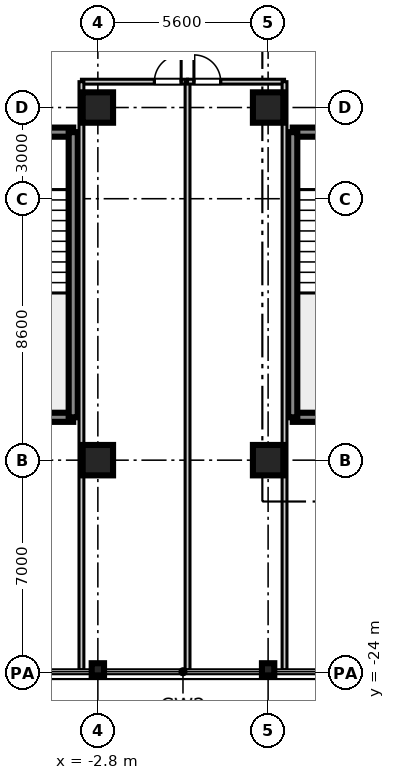
"""IFC4 building model, lengths in metres.
Left out: names, types, materials, properties, quantities, classifications, styles, units other than length and angle.
Written with IfcOpenShell. Run it as: python <this file> out.ifc"""

import sys

from ifc_helpers import new_model, si_unit, direction, frame, frame_2d, origin, origin_2d, place, context, subcontext, project, spatial, rectangle, i_section, extrude, source, transform, mapped, element, fill, save


model = new_model("IFC4")
c1 = context("Model", 3, precision=1e-05, world=origin(), true_north=direction((0.0, 1.0)))
c2 = subcontext(c1, "Body", "Model", "MODEL_VIEW")
j1 = project(units=[si_unit("LENGTHUNIT", "METRE"), si_unit("PLANEANGLEUNIT", "RADIAN")], contexts=[c1])
p1 = place(None, origin())
s1 = spatial("IfcSite", under=j1, at=p1, CompositionType="ELEMENT")
p2 = place(p1, origin())
s2 = spatial("IfcBuilding", under=s1, at=p2, CompositionType="ELEMENT")
p3 = place(p2, frame((0.0, 0.0, 204.9)))
s3 = spatial("IfcBuildingStorey", under=s2, at=p3, CompositionType="ELEMENT", Elevation=204.9)
m1 = source(origin(), c2, "Body", "SweptSolid", [
    extrude(rectangle(XDim=1.0, YDim=1.0, at=origin_2d()), origin(), (0.0, 0.0, 1.0), 3.655),
])
for number, where, z_axis, x_axis in (
    (1, (-2.8, -17.0, 0.0), (0.0, 0.0, 1.0), (1.0, 0.0, 0.0)),
    (2, (-2.8, -5.4, 0.0), (0.0, 0.0, 1.0), (1.0, 0.0, 0.0)),
    (3, (2.8, -17.0, 0.0), (0.0, 0.0, 1.0), (1.0, 0.0, 0.0)),
    (4, (2.8, -5.4, 0.0), (0.0, 0.0, 1.0), (1.0, 0.0, 0.0)),
):
    element("IfcColumn", number, at=place(p3, frame(where, z_axis=z_axis, x_axis=x_axis)), inside=s3, PredefinedType="COLUMN", context=c2, shape_type="MappedRepresentation", body=[
        mapped(m1, transform((0.0, 0.0, 0.0), scale=1.0)),
    ])
m2 = source(origin(), c2, "Body", "SweptSolid", [
    extrude(i_section(OverallWidth=0.401, OverallDepth=0.406, WebThickness=0.016, FlangeThickness=0.025, at=origin_2d()), origin(), (0.0, 0.0, 1.0), 3.655),
])
for number, where, z_axis, x_axis in (
    (5, (-2.8, -23.88, 0.0), (0.0, 0.0, 1.0), (0.0, 1.0, 0.0)),
    (6, (2.8, -23.88, 0.0), (0.0, 0.0, 1.0), (0.0, 1.0, 0.0)),
):
    element("IfcColumn", number, at=place(p3, frame(where, z_axis=z_axis, x_axis=x_axis)), inside=s3, PredefinedType="COLUMN", context=c2, shape_type="MappedRepresentation", body=[
        mapped(m2, transform((0.0, 0.0, 0.0), scale=1.0)),
    ])
m3 = source(origin(), c2, "Body", "SweptSolid", [
    extrude(rectangle(XDim=3.98, YDim=0.3, at=frame_2d((1.99, 0.0))), origin(), (0.0, 0.0, 1.0), 3.41),
])
for number, where, z_axis, x_axis in (
    (7, (3.61, -15.59, 0.0), (0.0, 0.0, 1.0), (1.0, 0.0, 0.0)),
    (8, (3.61, -6.21, 0.0), (0.0, 0.0, 1.0), (1.0, 0.0, 0.0)),
):
    element("IfcWall", number, at=place(p3, frame(where, z_axis=z_axis, x_axis=x_axis)), inside=s3, PredefinedType="SHEAR", context=c2, shape_type="MappedRepresentation", body=[
        mapped(m3, transform((0.0, 0.0, 0.0), scale=1.0)),
    ])
m4 = source(origin(), c2, "Body", "SweptSolid", [
    extrude(rectangle(XDim=9.38, YDim=0.3, at=frame_2d((4.69, 0.0))), origin(), (0.0, 0.0, 1.0), 3.41),
])
p4 = place(p3, frame((3.61, -15.59, 0.0), z_axis=(0.0, 0.0, 1.0), x_axis=(0.0, 1.0, 0.0)))
e9 = element("IfcWall", 9, at=p4, inside=s3, PredefinedType="SHEAR", context=c2, shape_type="MappedRepresentation", body=[
    mapped(m4, transform((0.0, 0.0, 0.0), scale=1.0)),
])
p5 = place(p3, frame((-7.59, -15.59, 0.0), z_axis=(0.0, 0.0, 1.0), x_axis=(1.0, 0.0, 0.0)))
e10 = element("IfcWall", 10, at=p5, inside=s3, PredefinedType="SHEAR", context=c2, shape_type="MappedRepresentation", body=[
    mapped(m3, transform((0.0, 0.0, 0.0), scale=1.0)),
])
p6 = place(p3, frame((-7.59, -6.21, 0.0), z_axis=(0.0, 0.0, 1.0), x_axis=(1.0, 0.0, 0.0)))
e11 = element("IfcWall", 11, at=p6, inside=s3, PredefinedType="SHEAR", context=c2, shape_type="MappedRepresentation", body=[
    mapped(m3, transform((0.0, 0.0, 0.0), scale=1.0)),
])
p7 = place(p6, frame((1.44, 0.0, 0.0)))
e12 = element("IfcOpeningElement", 12, at=p7, cuts=e11, PredefinedType="OPENING", context=c2, shape_type="SweptSolid", body=[
    extrude(rectangle(XDim=1.1, YDim=2.15, at=frame_2d((0.55, 1.075))), frame((0.0, 0.16, 0.0), z_axis=(0.0, -1.0, 0.0), x_axis=(1.0, 0.0, 0.0)), (0.0, 0.0, 1.0), 0.32),
])
p8 = place(p3, frame((-3.61, -15.59, 0.0), z_axis=(0.0, 0.0, 1.0), x_axis=(0.0, 1.0, 0.0)))
e13 = element("IfcWall", 13, at=p8, inside=s3, PredefinedType="SHEAR", context=c2, shape_type="MappedRepresentation", body=[
    mapped(m4, transform((0.0, 0.0, 0.0), scale=1.0)),
])
m5 = source(origin(), c2, "Body", "SweptSolid", [
    extrude(rectangle(XDim=3.49, YDim=0.16, at=frame_2d((1.745, 0.0))), origin(), (0.0, 0.0, 1.0), 2.75),
])
p9 = place(p3, frame((-3.34, -4.55, 0.0), z_axis=(0.0, 0.0, 1.0), x_axis=(1.0, 0.0, 0.0)))
e14 = element("IfcWall", 14, at=p9, inside=s3, PredefinedType="PARTITIONING", context=c2, shape_type="MappedRepresentation", body=[
    mapped(m5, transform((0.0, 0.0, 0.0), scale=1.0)),
])
p10 = place(p9, frame((2.4, 0.0, 0.0)))
e15 = element("IfcOpeningElement", 15, at=p10, cuts=e14, PredefinedType="OPENING", context=c2, shape_type="SweptSolid", body=[
    extrude(rectangle(XDim=0.88, YDim=2.1, at=frame_2d((0.44, 1.05))), frame((0.0, 0.09, 0.0), z_axis=(0.0, -1.0, 0.0), x_axis=(1.0, 0.0, 0.0)), (0.0, 0.0, 1.0), 0.18),
])
m6 = source(origin(), c2, "Body", "SweptSolid", [
    extrude(rectangle(XDim=19.35, YDim=0.16, at=frame_2d((9.675, 0.0))), origin(), (0.0, 0.0, 1.0), 2.75),
])
for number, where, z_axis, x_axis in (
    (16, (-3.34, -23.9, 0.0), (0.0, 0.0, 1.0), (0.0, 1.0, 0.0)),
    (17, (0.15, -23.9, 0.0), (0.0, 0.0, 1.0), (0.0, 1.0, 0.0)),
):
    element("IfcWall", number, at=place(p3, frame(where, z_axis=z_axis, x_axis=x_axis)), inside=s3, PredefinedType="PARTITIONING", context=c2, shape_type="MappedRepresentation", body=[
        mapped(m6, transform((0.0, 0.0, 0.0), scale=1.0)),
    ])
m7 = source(origin(), c2, "Body", "SweptSolid", [
    extrude(rectangle(XDim=3.19, YDim=0.16, at=frame_2d((1.595, 0.0))), origin(), (0.0, 0.0, 1.0), 2.75),
])
p11 = place(p3, frame((0.15, -4.55, 0.0), z_axis=(0.0, 0.0, 1.0), x_axis=(1.0, 0.0, 0.0)))
e18 = element("IfcWall", 18, at=p11, inside=s3, PredefinedType="PARTITIONING", context=c2, shape_type="MappedRepresentation", body=[
    mapped(m7, transform((0.0, 0.0, 0.0), scale=1.0)),
])
p12 = place(p11, frame((0.21, 0.0, 0.0)))
e19 = element("IfcOpeningElement", 19, at=p12, cuts=e18, PredefinedType="OPENING", context=c2, shape_type="SweptSolid", body=[
    extrude(rectangle(XDim=0.88, YDim=2.1, at=frame_2d((0.44, 1.05))), frame((0.0, 0.09, 0.0), z_axis=(0.0, -1.0, 0.0), x_axis=(1.0, 0.0, 0.0)), (0.0, 0.0, 1.0), 0.18),
])
p13 = place(p3, frame((3.34, -23.9, 0.0), z_axis=(0.0, 0.0, 1.0), x_axis=(0.0, 1.0, 0.0)))
e20 = element("IfcWall", 20, at=p13, inside=s3, PredefinedType="PARTITIONING", context=c2, shape_type="MappedRepresentation", body=[
    mapped(m6, transform((0.0, 0.0, 0.0), scale=1.0)),
])
m8 = source(origin(), c2, "Body", "SweptSolid", [
    extrude(rectangle(XDim=0.88, YDim=2.1, at=frame_2d((0.44, 1.05))), frame((0.0, 0.025, 0.0), z_axis=(0.0, -1.0, 0.0), x_axis=(1.0, 0.0, 0.0)), (0.0, 0.0, 1.0), 0.05),
])
p14 = place(p10, frame((0.88, 0.0, 0.0), z_axis=(0.0, 0.0, 1.0), x_axis=(-1.0, 0.0, 0.0)))
e21 = element("IfcDoor", 21, at=p14, inside=s3, OperationType="SINGLE_SWING_RIGHT", PredefinedType="DOOR", context=c2, shape_type="MappedRepresentation", body=[
    mapped(m8, transform((0.0, 0.0, 0.0), scale=1.0)),
])
fill(e15, e21)
p15 = place(p12, frame((0.88, 0.0, 0.0), z_axis=(0.0, 0.0, 1.0), x_axis=(-1.0, 0.0, 0.0)))
e22 = element("IfcDoor", 22, at=p15, inside=s3, OperationType="SINGLE_SWING_LEFT", PredefinedType="DOOR", context=c2, shape_type="MappedRepresentation", body=[
    mapped(m8, transform((0.0, 0.0, 0.0), scale=1.0)),
])
fill(e19, e22)
save(model, sys.argv[1])
